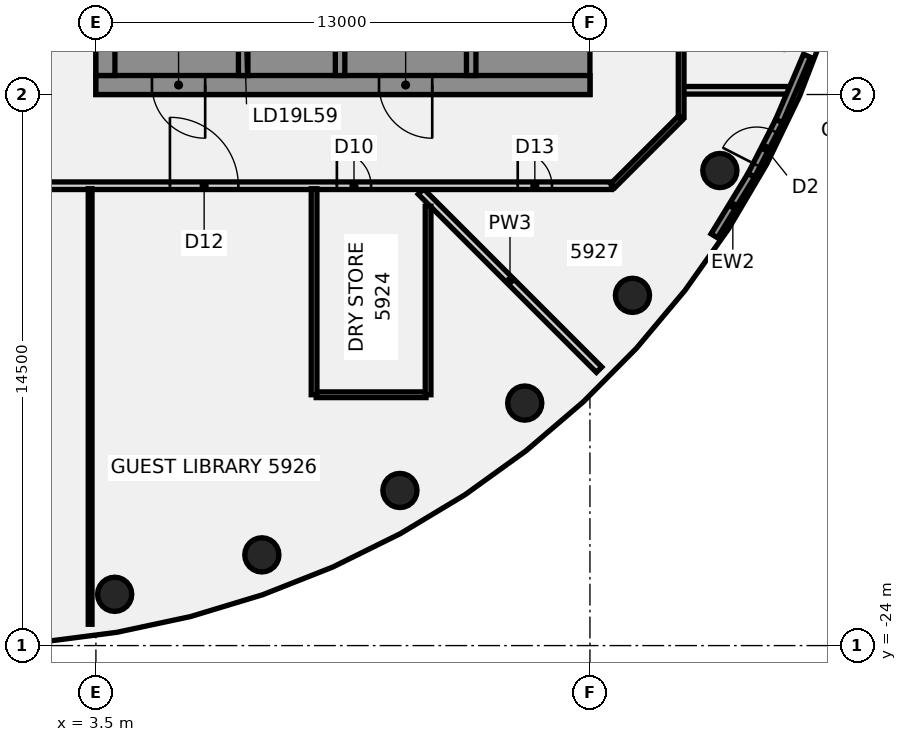
"""IFC4 building model, lengths in metres.
Left out: names, types, materials, properties, quantities, classifications, styles, units other than length and angle.
Written with IfcOpenShell. Run it as: python <this file> out.ifc"""

import sys

from ifc_helpers import new_model, si_unit, direction, frame, frame_2d, origin, origin_2d, place, context, subcontext, project, spatial, polyline, rectangle, circle, outline, extrude, element, fill, save


model = new_model("IFC4")
c1 = context("Model", 3, precision=1e-05, world=origin(), true_north=direction((0.0, 1.0)))
c2 = subcontext(c1, "Body", "Model", "MODEL_VIEW")
j1 = project(units=[si_unit("LENGTHUNIT", "METRE"), si_unit("PLANEANGLEUNIT", "RADIAN")], contexts=[c1])
p1 = place(None, origin())
s1 = spatial("IfcSite", under=j1, at=p1, CompositionType="ELEMENT")
p2 = place(p1, origin())
s2 = spatial("IfcBuilding", under=s1, at=p2, CompositionType="ELEMENT")
p3 = place(p2, frame((0.0, 0.0, 234.3)))
s3 = spatial("IfcBuildingStorey", under=s2, at=p3, CompositionType="ELEMENT", Elevation=234.3)
for number, where, z_axis, x_axis in (
    (1, (3.994, -22.651, -0.14), (0.0, 0.0, 1.0), (1.0, 0.0, 0.0)),
    (2, (7.866, -21.613, -0.14), (0.0, 0.0, 1.0), (1.0, 0.0, 0.0)),
    (3, (11.5, -19.919, -0.14), (0.0, 0.0, 1.0), (1.0, 0.0, 0.0)),
    (4, (14.784, -17.619, -0.14), (0.0, 0.0, 1.0), (1.0, 0.0, 0.0)),
    (5, (17.619, -14.784, -0.14), (0.0, 0.0, 1.0), (1.0, 0.0, 0.0)),
    (6, (19.919, -11.5, -0.14), (0.0, 0.0, 1.0), (1.0, 0.0, 0.0)),
):
    element("IfcColumn", number, at=place(p3, frame(where, z_axis=z_axis, x_axis=x_axis)), inside=s3, PredefinedType="COLUMN", context=c2, shape_type="SweptSolid", body=[
        extrude(circle(Radius=0.45, at=origin_2d()), origin(), (0.0, 0.0, 1.0), 3.6),
    ])
p4 = place(p3, frame((12.052, -12.052, 0.0), z_axis=(0.0, 0.0, 1.0), x_axis=(0.707106781187, -0.707106781187, 0.0)))
e7 = element("IfcWall", 7, at=p4, inside=s3, PredefinedType="PARTITIONING", context=c2, shape_type="SweptSolid", body=[
    extrude(rectangle(XDim=6.631, YDim=0.2, at=frame_2d((3.315, 0.0))), origin(), (0.0, 0.0, 1.0), 2.864),
])
p5 = place(p3, frame((-17.1, -11.9, 0.0), z_axis=(0.0, 0.0, 1.0), x_axis=(1.0, 0.0, 0.0)))
e8 = element("IfcWall", 8, at=p5, inside=s3, PredefinedType="PARTITIONING", context=c2, shape_type="SweptSolid", body=[
    extrude(rectangle(XDim=34.165, YDim=0.2, at=frame_2d((17.083, 0.0))), origin(), (0.0, 0.0, 1.0), 2.864),
])
p6 = place(p5, frame((9.85, 0.0, 0.0)))
e9 = element("IfcOpeningElement", 9, at=p6, cuts=e8, PredefinedType="OPENING", context=c2, shape_type="SweptSolid", body=[
    extrude(rectangle(XDim=0.9, YDim=2.1, at=frame_2d((0.45, 1.05))), frame((0.0, 0.11, 0.0), z_axis=(0.0, -1.0, 0.0), x_axis=(1.0, 0.0, 0.0)), (0.0, 0.0, 1.0), 0.22),
])
p7 = place(p5, frame((26.941, 0.0, 0.0)))
e10 = element("IfcOpeningElement", 10, at=p7, cuts=e8, PredefinedType="OPENING", context=c2, shape_type="SweptSolid", body=[
    extrude(rectangle(XDim=0.9, YDim=2.1, at=frame_2d((0.45, 1.05))), frame((0.0, 0.11, 0.0), z_axis=(0.0, -1.0, 0.0), x_axis=(1.0, 0.0, 0.0)), (0.0, 0.0, 1.0), 0.22),
])
p8 = place(p5, frame((16.059, 0.0, 0.0)))
e11 = element("IfcOpeningElement", 11, at=p8, cuts=e8, PredefinedType="OPENING", context=c2, shape_type="SweptSolid", body=[
    extrude(rectangle(XDim=1.8, YDim=2.1, at=frame_2d((0.9, 1.05))), frame((0.0, 0.11, 0.0), z_axis=(0.0, -1.0, 0.0), x_axis=(1.0, 0.0, 0.0)), (0.0, 0.0, 1.0), 0.22),
])
p9 = place(p5, frame((22.548, 0.0, 0.0)))
e12 = element("IfcOpeningElement", 12, at=p9, cuts=e8, PredefinedType="OPENING", context=c2, shape_type="SweptSolid", body=[
    extrude(rectangle(XDim=1.8, YDim=2.1, at=frame_2d((0.9, 1.05))), frame((0.0, 0.11, 0.0), z_axis=(0.0, -1.0, 0.0), x_axis=(1.0, 0.0, 0.0)), (0.0, 0.0, 1.0), 0.22),
])
p10 = place(p5, frame((31.7, 0.0, 0.0)))
e13 = element("IfcOpeningElement", 13, at=p10, cuts=e8, PredefinedType="OPENING", context=c2, shape_type="SweptSolid", body=[
    extrude(rectangle(XDim=0.9, YDim=2.1, at=frame_2d((0.45, 1.05))), frame((0.0, 0.11, 0.0), z_axis=(0.0, -1.0, 0.0), x_axis=(1.0, 0.0, 0.0)), (0.0, 0.0, 1.0), 0.22),
])
p11 = place(p5, frame((2.85, 0.0, 0.0)))
e14 = element("IfcOpeningElement", 14, at=p11, cuts=e8, PredefinedType="OPENING", context=c2, shape_type="SweptSolid", body=[
    extrude(rectangle(XDim=0.9, YDim=2.1, at=frame_2d((0.45, 1.05))), frame((0.0, 0.11, 0.0), z_axis=(0.0, -1.0, 0.0), x_axis=(1.0, 0.0, 0.0)), (0.0, 0.0, 1.0), 0.22),
])
p12 = place(p3, frame((9.296, -17.4, 0.0), z_axis=(0.0, 0.0, 1.0), x_axis=(1.0, 0.0, 0.0)))
e15 = element("IfcWall", 15, at=p12, inside=s3, PredefinedType="PARTITIONING", context=c2, shape_type="SweptSolid", body=[
    extrude(rectangle(XDim=2.89, YDim=0.15, at=frame_2d((1.445, 0.0))), origin(), (0.0, 0.0, 1.0), 2.864),
])
p13 = place(p3, frame((18.955, -9.389, 0.0), z_axis=(0.0, 0.0, 1.0), x_axis=(1.0, 0.0, 0.0)))
e16 = element("IfcWall", 16, at=p13, inside=s3, PredefinedType="PARTITIONING", context=c2, shape_type="SweptSolid", body=[
    extrude(rectangle(XDim=2.798, YDim=0.2, at=frame_2d((1.399, 0.0))), origin(), (0.0, 0.0, 1.0), 2.864),
])
p14 = place(p3, frame((17.1, -11.9, 0.0), z_axis=(0.0, 0.0, 1.0), x_axis=(0.707106781187, 0.707106781187, 0.0)))
e17 = element("IfcWall", 17, at=p14, inside=s3, PredefinedType="PARTITIONING", context=c2, shape_type="SweptSolid", body=[
    extrude(rectangle(XDim=2.505, YDim=0.15, at=frame_2d((1.253, 0.0))), origin(), (0.0, 0.0, 1.0), 2.864),
])
p15 = place(p3, frame((3.348, -23.439, 0.0), z_axis=(0.0, 0.0, 1.0), x_axis=(0.0, 1.0, 0.0)))
e18 = element("IfcWall", 18, at=p15, inside=s3, PredefinedType="PARTITIONING", context=c2, shape_type="SweptSolid", body=[
    extrude(rectangle(XDim=11.459, YDim=0.1, at=frame_2d((5.729, 0.0))), origin(), (0.0, 0.0, 1.0), 2.864),
])
p16 = place(p3, frame((9.241, -17.4, 0.0), z_axis=(0.0, 0.0, 1.0), x_axis=(0.0, 1.0, 0.0)))
e19 = element("IfcWall", 19, at=p16, inside=s3, PredefinedType="PARTITIONING", context=c2, shape_type="SweptSolid", body=[
    extrude(rectangle(XDim=5.42, YDim=0.15, at=frame_2d((2.71, 0.0))), origin(), (0.0, 0.0, 1.0), 2.864),
])
p17 = place(p3, frame((12.241, -17.4, 0.0), z_axis=(0.0, 0.0, 1.0), x_axis=(0.0, 1.0, 0.0)))
e20 = element("IfcWall", 20, at=p17, inside=s3, PredefinedType="PARTITIONING", context=c2, shape_type="SweptSolid", body=[
    extrude(rectangle(XDim=4.959, YDim=0.15, at=frame_2d((2.479, 0.0))), origin(), (0.0, 0.0, 1.0), 2.864),
])
p18 = place(p3, frame((18.9, -10.1, 0.0), z_axis=(0.0, 0.0, 1.0), x_axis=(0.0, 1.0, 0.0)))
e21 = element("IfcWall", 21, at=p18, inside=s3, PredefinedType="PARTITIONING", context=c2, shape_type="SweptSolid", body=[
    extrude(rectangle(XDim=20.2, YDim=0.15, at=frame_2d((10.1, 0.0))), origin(), (0.0, 0.0, 1.0), 2.864),
])
p19 = place(p18, frame((4.911, 0.0, 0.0)))
e22 = element("IfcOpeningElement", 22, at=p19, cuts=e21, PredefinedType="OPENING", context=c2, shape_type="SweptSolid", body=[
    extrude(rectangle(XDim=0.9, YDim=2.1, at=frame_2d((0.45, 1.05))), frame((0.0, 0.085, 0.0), z_axis=(0.0, -1.0, 0.0), x_axis=(1.0, 0.0, 0.0)), (0.0, 0.0, 1.0), 0.17),
])
p20 = place(p3, frame((19.772, -13.218, 0.0), z_axis=(0.0, 0.0, 1.0), x_axis=(0.52165588039, 0.85315598952, 0.0)))
e23 = element("IfcWall", 23, at=p20, inside=s3, PredefinedType="SOLIDWALL", context=c2, shape_type="SweptSolid", body=[
    extrude(rectangle(XDim=1.871, YDim=0.2, at=frame_2d((0.935, 0.0))), origin(), (0.0, 0.0, 1.0), 3.46),
])
p21 = place(p3, frame((21.477, -10.199, 0.0), z_axis=(0.0, 0.0, 1.0), x_axis=(0.392831837578, 0.919610323662, 0.0)))
e24 = element("IfcWall", 24, at=p21, inside=s3, PredefinedType="SOLIDWALL", context=c2, shape_type="SweptSolid", body=[
    extrude(rectangle(XDim=1.87, YDim=0.2, at=frame_2d((0.935, 0.0))), origin(), (0.0, 0.0, 1.0), 3.46),
])
p22 = place(p3, frame((20.748, -11.622, 0.0), z_axis=(0.0, 0.0, 1.0), x_axis=(0.456108930907, 0.889923953575, 0.0)))
e25 = element("IfcWall", 25, at=p22, inside=s3, PredefinedType="SOLIDWALL", context=c2, shape_type="SweptSolid", body=[
    extrude(rectangle(XDim=1.599, YDim=0.2, at=frame_2d((0.799, 0.0))), origin(), (0.0, 0.0, 1.0), 3.46),
])
p23 = place(p22, frame((0.3, 0.0, 0.0)))
e26 = element("IfcOpeningElement", 26, at=p23, cuts=e25, PredefinedType="OPENING", context=c2, shape_type="SweptSolid", body=[
    extrude(rectangle(XDim=1.0, YDim=2.4, at=frame_2d((0.5, 1.2))), frame((0.0, 0.11, 0.0), z_axis=(0.0, -1.0, 0.0), x_axis=(1.0, 0.0, 0.0)), (0.0, 0.0, 1.0), 0.22),
])
p24 = place(p3, frame((16.5, -9.25, 0.0), z_axis=(0.0, 0.0, 1.0), x_axis=(-1.0, 0.0, 0.0)))
e27 = element("IfcWall", 27, at=p24, inside=s3, PredefinedType="SHEAR", context=c2, shape_type="SweptSolid", body=[
    extrude(rectangle(XDim=13.0, YDim=0.5, at=frame_2d((6.5, 0.0))), origin(), (0.0, 0.0, 1.0), 3.46),
])
p25 = place(p24, frame((4.15, 0.0, 0.0)))
e28 = element("IfcOpeningElement", 28, at=p25, cuts=e27, PredefinedType="OPENING", context=c2, shape_type="SweptSolid", body=[
    extrude(rectangle(XDim=1.4, YDim=2.1, at=frame_2d((0.7, 1.05))), frame((0.0, 0.26, 0.0), z_axis=(0.0, -1.0, 0.0), x_axis=(1.0, 0.0, 0.0)), (0.0, 0.0, 1.0), 0.52),
])
p26 = place(p24, frame((10.125, 0.0, 0.0)))
e29 = element("IfcOpeningElement", 29, at=p26, cuts=e27, PredefinedType="OPENING", context=c2, shape_type="SweptSolid", body=[
    extrude(rectangle(XDim=1.4, YDim=2.1, at=frame_2d((0.7, 1.05))), frame((0.0, 0.26, 0.0), z_axis=(0.0, -1.0, 0.0), x_axis=(1.0, 0.0, 0.0)), (0.0, 0.0, 1.0), 0.52),
])
p27 = place(p3, origin())
e30 = element("IfcWall", 30, at=p27, inside=s3, PredefinedType="SHEAR", context=c2, shape_type="SweptSolid", body=[
    extrude(outline(polyline([(13.5, -8.125), (13.5, -9.0), (16.0, -9.0), (16.5, -9.0), (16.5, 9.0), (16.0, 9.0), (13.5, 9.0), (13.5, 8.125), (16.0, 8.125), (16.0, 5.625), (13.5, 5.625), (13.5, 5.375), (16.0, 5.375), (16.0, -5.375), (13.5, -5.375), (13.5, -5.625), (16.0, -5.625), (16.0, -8.125), (13.5, -8.125)])), origin(), (0.0, 0.0, 1.0), 3.46),
])
p28 = place(p3, origin())
e31 = element("IfcWall", 31, at=p28, inside=s3, PredefinedType="SHEAR", context=c2, shape_type="SweptSolid", body=[
    extrude(outline(polyline([(7.5, -8.125), (7.5, -9.0), (9.8, -9.0), (9.8, -8.125), (9.8, -5.625), (9.55, -5.625), (9.55, -8.125), (7.5, -8.125)])), origin(), (0.0, 0.0, 1.0), 3.46),
])
p29 = place(p3, frame((7.375, -9.0, 0.0), z_axis=(0.0, 0.0, 1.0), x_axis=(0.0, 1.0, 0.0)))
e32 = element("IfcWall", 32, at=p29, inside=s3, PredefinedType="SHEAR", context=c2, shape_type="SweptSolid", body=[
    extrude(rectangle(XDim=0.875, YDim=0.25, at=frame_2d((0.438, 0.0))), origin(), (0.0, 0.0, 1.0), 3.46),
])
p30 = place(p3, frame((13.375, -9.0, 0.0), z_axis=(0.0, 0.0, 1.0), x_axis=(0.0, 1.0, 0.0)))
e33 = element("IfcWall", 33, at=p30, inside=s3, PredefinedType="SHEAR", context=c2, shape_type="SweptSolid", body=[
    extrude(rectangle(XDim=18.0, YDim=0.25, at=frame_2d((9.0, 0.0))), origin(), (0.0, 0.0, 1.0), 3.46),
])
p31 = place(p30, frame((1.425, 0.0, 0.0)))
e34 = element("IfcOpeningElement", 34, at=p31, cuts=e33, PredefinedType="OPENING", context=c2, shape_type="SweptSolid", body=[
    extrude(rectangle(XDim=1.4, YDim=2.1, at=frame_2d((0.7, 1.05))), frame((0.0, 0.135, 0.0), z_axis=(0.0, -1.0, 0.0), x_axis=(1.0, 0.0, 0.0)), (0.0, 0.0, 1.0), 0.27),
])
p32 = place(p30, frame((4.854, 0.0, 0.0)))
e35 = element("IfcOpeningElement", 35, at=p32, cuts=e33, PredefinedType="OPENING", context=c2, shape_type="SweptSolid", body=[
    extrude(rectangle(XDim=1.0, YDim=2.1, at=frame_2d((0.5, 1.05))), frame((0.0, 0.135, 0.0), z_axis=(0.0, -1.0, 0.0), x_axis=(1.0, 0.0, 0.0)), (0.0, 0.0, 1.0), 0.27),
])
p33 = place(p30, frame((10.354, 0.0, 0.0)))
e36 = element("IfcOpeningElement", 36, at=p33, cuts=e33, PredefinedType="OPENING", context=c2, shape_type="SweptSolid", body=[
    extrude(rectangle(XDim=1.0, YDim=2.1, at=frame_2d((0.5, 1.05))), frame((0.0, 0.135, 0.0), z_axis=(0.0, -1.0, 0.0), x_axis=(1.0, 0.0, 0.0)), (0.0, 0.0, 1.0), 0.27),
])
p34 = place(p3, frame((9.925, -9.0, 0.0), z_axis=(0.0, 0.0, 1.0), x_axis=(0.0, 1.0, 0.0)))
e37 = element("IfcWall", 37, at=p34, inside=s3, PredefinedType="SHEAR", context=c2, shape_type="SweptSolid", body=[
    extrude(rectangle(XDim=18.0, YDim=0.25, at=frame_2d((9.0, 0.0))), origin(), (0.0, 0.0, 1.0), 3.46),
])
p35 = place(p34, frame((12.575, 0.0, 0.0)))
e38 = element("IfcOpeningElement", 38, at=p35, cuts=e37, PredefinedType="OPENING", context=c2, shape_type="SweptSolid", body=[
    extrude(rectangle(XDim=1.1, YDim=2.1, at=frame_2d((0.55, 1.05))), frame((0.0, 0.135, 0.0), z_axis=(0.0, -1.0, 0.0), x_axis=(1.0, 0.0, 0.0)), (0.0, 0.0, 1.0), 0.27),
])
p36 = place(p34, frame((15.325, 0.0, 0.0)))
e39 = element("IfcOpeningElement", 39, at=p36, cuts=e37, PredefinedType="OPENING", context=c2, shape_type="SweptSolid", body=[
    extrude(rectangle(XDim=1.1, YDim=2.1, at=frame_2d((0.55, 1.05))), frame((0.0, 0.135, 0.0), z_axis=(0.0, -1.0, 0.0), x_axis=(1.0, 0.0, 0.0)), (0.0, 0.0, 1.0), 0.27),
])
p37 = place(p34, frame((4.812, 0.0, 0.0)))
e40 = element("IfcOpeningElement", 40, at=p37, cuts=e37, PredefinedType="OPENING", context=c2, shape_type="SweptSolid", body=[
    extrude(rectangle(XDim=1.0, YDim=2.1, at=frame_2d((0.5, 1.05))), frame((0.0, 0.135, 0.0), z_axis=(0.0, -1.0, 0.0), x_axis=(1.0, 0.0, 0.0)), (0.0, 0.0, 1.0), 0.27),
])
p38 = place(p34, frame((7.562, 0.0, 0.0)))
e41 = element("IfcOpeningElement", 41, at=p38, cuts=e37, PredefinedType="OPENING", context=c2, shape_type="SweptSolid", body=[
    extrude(rectangle(XDim=1.0, YDim=2.1, at=frame_2d((0.5, 1.05))), frame((0.0, 0.135, 0.0), z_axis=(0.0, -1.0, 0.0), x_axis=(1.0, 0.0, 0.0)), (0.0, 0.0, 1.0), 0.27),
])
p39 = place(p34, frame((9.396, 0.0, 0.0)))
e42 = element("IfcOpeningElement", 42, at=p39, cuts=e37, PredefinedType="OPENING", context=c2, shape_type="SweptSolid", body=[
    extrude(rectangle(XDim=1.0, YDim=2.1, at=frame_2d((0.5, 1.05))), frame((0.0, 0.135, 0.0), z_axis=(0.0, -1.0, 0.0), x_axis=(1.0, 0.0, 0.0)), (0.0, 0.0, 1.0), 0.27),
])
p40 = place(p34, frame((10.771, 0.0, 0.0)))
e43 = element("IfcOpeningElement", 43, at=p40, cuts=e37, PredefinedType="OPENING", context=c2, shape_type="SweptSolid", body=[
    extrude(rectangle(XDim=1.0, YDim=2.1, at=frame_2d((0.5, 1.05))), frame((0.0, 0.135, 0.0), z_axis=(0.0, -1.0, 0.0), x_axis=(1.0, 0.0, 0.0)), (0.0, 0.0, 1.0), 0.27),
])
p41 = place(p3, frame((3.75, -9.0, 0.0), z_axis=(0.0, 0.0, 1.0), x_axis=(0.0, 1.0, 0.0)))
e44 = element("IfcWall", 44, at=p41, inside=s3, PredefinedType="SHEAR", context=c2, shape_type="SweptSolid", body=[
    extrude(rectangle(XDim=18.0, YDim=0.5, at=frame_2d((9.0, 0.0))), origin(), (0.0, 0.0, 1.0), 3.46),
])
p42 = place(p41, frame((1.35, 0.0, 0.0)))
e45 = element("IfcOpeningElement", 45, at=p42, cuts=e44, PredefinedType="OPENING", context=c2, shape_type="SweptSolid", body=[
    extrude(rectangle(XDim=1.8, YDim=2.1, at=frame_2d((0.9, 1.05))), frame((0.0, 0.26, 0.0), z_axis=(0.0, -1.0, 0.0), x_axis=(1.0, 0.0, 0.0)), (0.0, 0.0, 1.0), 0.52),
])
p43 = place(p41, frame((12.75, 0.0, 0.0)))
e46 = element("IfcOpeningElement", 46, at=p43, cuts=e44, PredefinedType="OPENING", context=c2, shape_type="SweptSolid", body=[
    extrude(rectangle(XDim=1.0, YDim=2.1, at=frame_2d((0.5, 1.05))), frame((0.0, 0.26, 0.0), z_axis=(0.0, -1.0, 0.0), x_axis=(1.0, 0.0, 0.0)), (0.0, 0.0, 1.0), 0.52),
])
p44 = place(p41, frame((16.274, 0.0, 0.0)))
e47 = element("IfcOpeningElement", 47, at=p44, cuts=e44, PredefinedType="OPENING", context=c2, shape_type="SweptSolid", body=[
    extrude(rectangle(XDim=1.0, YDim=2.1, at=frame_2d((0.5, 1.05))), frame((0.0, 0.26, 0.0), z_axis=(0.0, -1.0, 0.0), x_axis=(1.0, 0.0, 0.0)), (0.0, 0.0, 1.0), 0.52),
])
p45 = place(p7, frame((0.9, 0.0, 0.0), z_axis=(0.0, 0.0, 1.0), x_axis=(-1.0, 0.0, 0.0)))
e48 = element("IfcDoor", 48, at=p45, inside=s3, OperationType="SINGLE_SWING_RIGHT", PredefinedType="DOOR", context=c2, shape_type="SweptSolid", body=[
    extrude(rectangle(XDim=0.9, YDim=2.1, at=frame_2d((0.45, 1.05))), frame((0.0, 0.025, 0.0), z_axis=(0.0, -1.0, 0.0), x_axis=(1.0, 0.0, 0.0)), (0.0, 0.0, 1.0), 0.05),
])
fill(e10, e48)
p46 = place(p9, frame((1.8, 0.0, 0.0), z_axis=(0.0, 0.0, 1.0), x_axis=(-1.0, 0.0, 0.0)))
e49 = element("IfcDoor", 49, at=p46, inside=s3, OperationType="DOUBLE_DOOR_SINGLE_SWING", PredefinedType="DOOR", context=c2, shape_type="SweptSolid", body=[
    extrude(rectangle(XDim=1.8, YDim=2.1, at=frame_2d((0.9, 1.05))), frame((0.0, 0.025, 0.0), z_axis=(0.0, -1.0, 0.0), x_axis=(1.0, 0.0, 0.0)), (0.0, 0.0, 1.0), 0.05),
])
fill(e12, e49)
p47 = place(p10, frame((0.9, 0.0, 0.0), z_axis=(0.0, 0.0, 1.0), x_axis=(-1.0, 0.0, 0.0)))
e50 = element("IfcDoor", 50, at=p47, inside=s3, OperationType="SINGLE_SWING_RIGHT", PredefinedType="DOOR", context=c2, shape_type="SweptSolid", body=[
    extrude(rectangle(XDim=0.9, YDim=2.1, at=frame_2d((0.45, 1.05))), frame((0.0, 0.025, 0.0), z_axis=(0.0, -1.0, 0.0), x_axis=(1.0, 0.0, 0.0)), (0.0, 0.0, 1.0), 0.05),
])
fill(e13, e50)
p48 = place(p23, origin())
e51 = element("IfcDoor", 51, at=p48, inside=s3, OperationType="SINGLE_SWING_LEFT", PredefinedType="DOOR", context=c2, shape_type="SweptSolid", body=[
    extrude(rectangle(XDim=1.0, YDim=2.4, at=frame_2d((0.5, 1.2))), frame((0.0, 0.025, 0.0), z_axis=(0.0, -1.0, 0.0), x_axis=(1.0, 0.0, 0.0)), (0.0, 0.0, 1.0), 0.05),
])
fill(e26, e51)
p49 = place(p25, origin())
e52 = element("IfcDoor", 52, at=p49, inside=s3, OperationType="SINGLE_SWING_LEFT", PredefinedType="DOOR", context=c2, shape_type="SweptSolid", body=[
    extrude(rectangle(XDim=1.4, YDim=2.1, at=frame_2d((0.7, 1.05))), frame((0.0, 0.025, 0.0), z_axis=(0.0, -1.0, 0.0), x_axis=(1.0, 0.0, 0.0)), (0.0, 0.0, 1.0), 0.05),
])
fill(e28, e52)
p50 = place(p26, origin())
e53 = element("IfcDoor", 53, at=p50, inside=s3, OperationType="SINGLE_SWING_LEFT", PredefinedType="DOOR", context=c2, shape_type="SweptSolid", body=[
    extrude(rectangle(XDim=1.4, YDim=2.1, at=frame_2d((0.7, 1.05))), frame((0.0, 0.025, 0.0), z_axis=(0.0, -1.0, 0.0), x_axis=(1.0, 0.0, 0.0)), (0.0, 0.0, 1.0), 0.05),
])
fill(e29, e53)
save(model, sys.argv[1])
